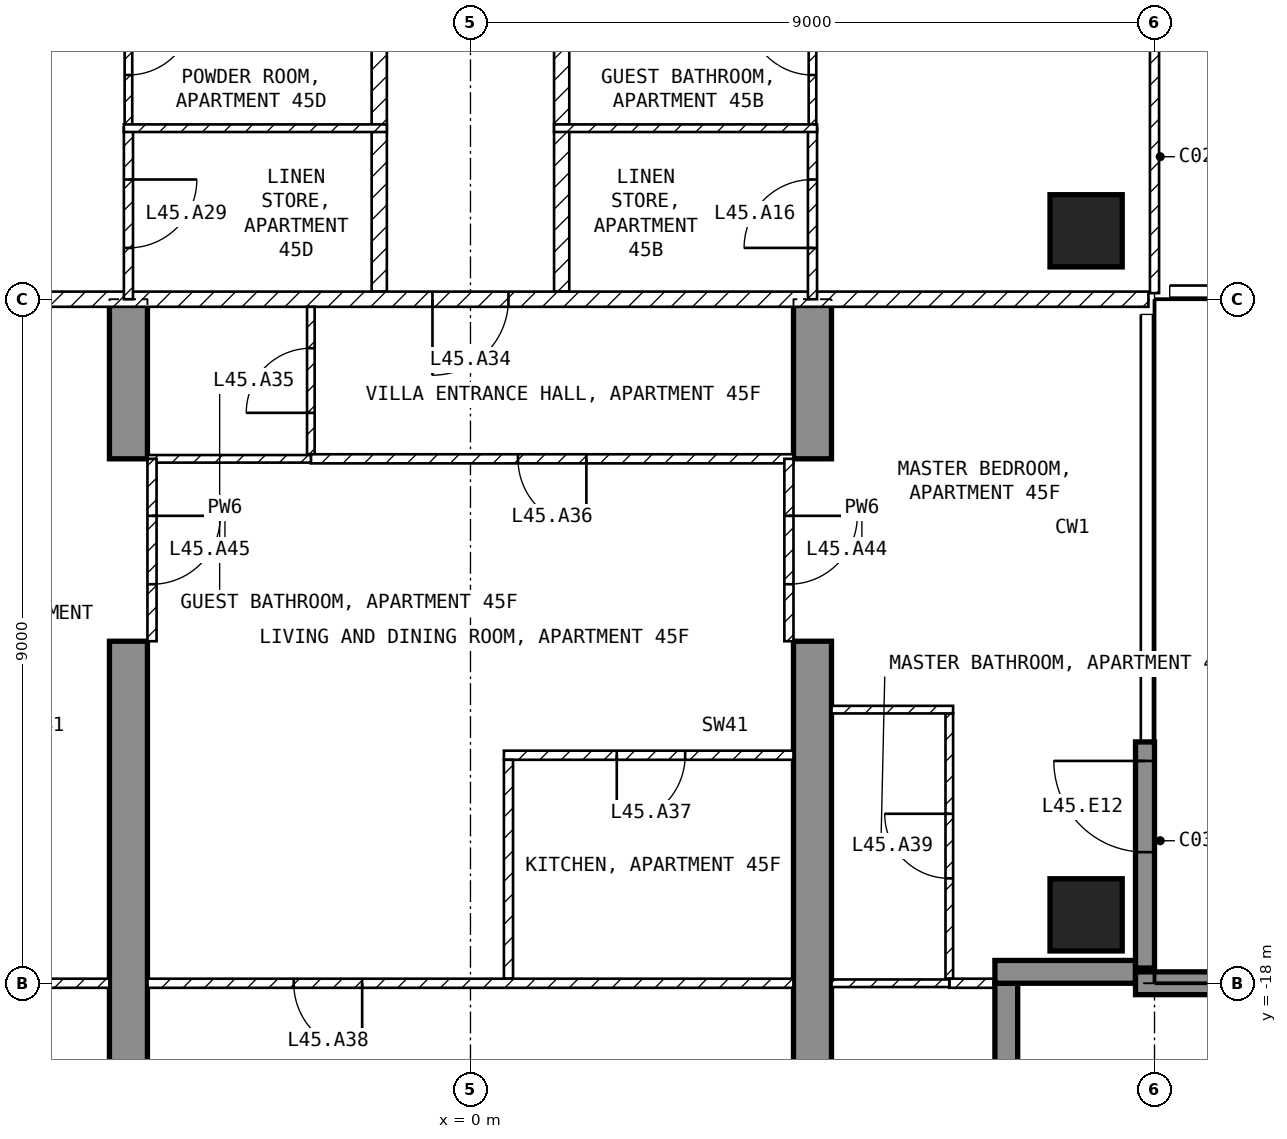
"""IFC4 building model, lengths in metres.
Left out: names, types, materials, properties, quantities, classifications, styles, units other than length and angle.
Written with IfcOpenShell. Run it as: python <this file> out.ifc"""

import sys

from ifc_helpers import new_model, si_unit, direction, frame, frame_2d, origin, origin_2d, place, context, subcontext, project, spatial, polyline, rectangle, outline, extrude, element, fill, save


model = new_model("IFC4")
c1 = context("Model", 3, precision=1e-05, world=origin(), true_north=direction((0.0, 1.0)))
c2 = subcontext(c1, "Body", "Model", "MODEL_VIEW")
j1 = project(units=[si_unit("LENGTHUNIT", "METRE"), si_unit("PLANEANGLEUNIT", "RADIAN")], contexts=[c1])
p1 = place(None, origin())
s1 = spatial("IfcSite", under=j1, at=p1, CompositionType="ELEMENT")
p2 = place(p1, origin())
s2 = spatial("IfcBuilding", under=s1, at=p2, CompositionType="ELEMENT")
p3 = place(p2, frame((0.0, 0.0, 184.1)))
s3 = spatial("IfcBuildingStorey", under=s2, at=p3, CompositionType="ELEMENT", Elevation=184.1)
for number, where, z_axis, x_axis in (
    (1, (8.1, -17.1, -0.25), (0.0, 0.0, 1.0), (1.0, 0.0, 0.0)),
    (2, (8.1, -8.1, -0.25), (0.0, 0.0, 1.0), (1.0, 0.0, 0.0)),
):
    element("IfcColumn", number, at=place(p3, frame(where, z_axis=z_axis, x_axis=x_axis)), inside=s3, PredefinedType="COLUMN", context=c2, shape_type="SweptSolid", body=[
        extrude(rectangle(XDim=0.95, YDim=0.95, at=origin_2d()), origin(), (0.0, 0.0, 1.0), 3.5),
    ])
for number, where, z_axis, x_axis in (
    (3, (-4.75, -20.225, -0.25), (1.0, 0.0, 0.0), (0.0, 1.0, 0.0)),
    (4, (4.25, -20.225, -0.25), (1.0, 0.0, 0.0), (0.0, 1.0, 0.0)),
):
    element("IfcWall", number, at=place(p3, frame(where, z_axis=z_axis, x_axis=x_axis)), inside=s3, PredefinedType="SHEAR", context=c2, shape_type="SweptSolid", body=[
        extrude(outline(polyline([(0.0, 0.0), (6.725, 0.0), (6.725, 2.65), (9.125, 2.65), (9.125, 0.0), (11.225, 0.0), (11.225, 3.5), (0.0, 3.5), (0.0, 0.0)])), origin(), (0.0, 0.0, 1.0), 0.5),
    ])
p4 = place(p3, frame((8.875, -17.8, 0.0), z_axis=(0.0, 0.0, 1.0), x_axis=(0.0, 1.0, 0.0)))
e5 = element("IfcWall", 5, at=p4, inside=s3, PredefinedType="SOLIDWALL", context=c2, shape_type="SweptSolid", body=[
    extrude(rectangle(XDim=2.975, YDim=0.25, at=frame_2d((1.488, 0.0))), origin(), (0.0, 0.0, 1.0), 3.25),
])
p5 = place(p4, frame((1.525, 0.0, 0.0)))
e6 = element("IfcOpeningElement", 6, at=p5, cuts=e5, PredefinedType="OPENING", context=c2, shape_type="SweptSolid", body=[
    extrude(rectangle(XDim=1.2, YDim=2.4, at=frame_2d((0.6, 1.2))), frame((0.0, 0.135, 0.0), z_axis=(0.0, -1.0, 0.0), x_axis=(1.0, 0.0, 0.0)), (0.0, 0.0, 1.0), 0.27),
])
p6 = place(p3, frame((7.05, -19.8, 0.0), z_axis=(0.0, 0.0, 1.0), x_axis=(0.0, 1.0, 0.0)))
e7 = element("IfcWall", 7, at=p6, inside=s3, PredefinedType="SOLIDWALL", context=c2, shape_type="SweptSolid", body=[
    extrude(rectangle(XDim=1.8, YDim=0.3, at=frame_2d((0.9, 0.0))), origin(), (0.0, 0.0, 1.0), 3.25),
])
p7 = place(p3, frame((6.9, -17.85, 0.0), z_axis=(0.0, 0.0, 1.0), x_axis=(1.0, 0.0, 0.0)))
e8 = element("IfcWall", 8, at=p7, inside=s3, PredefinedType="SOLIDWALL", context=c2, shape_type="SweptSolid", body=[
    extrude(rectangle(XDim=1.85, YDim=0.3, at=frame_2d((0.925, 0.0))), origin(), (0.0, 0.0, 1.0), 3.25),
])
p8 = place(p3, frame((8.75, -18.0, 0.0), z_axis=(0.0, 0.0, 1.0), x_axis=(1.0, 0.0, 0.0)))
e9 = element("IfcWall", 9, at=p8, inside=s3, PredefinedType="SOLIDWALL", context=c2, shape_type="SweptSolid", body=[
    extrude(rectangle(XDim=2.95, YDim=0.3, at=frame_2d((1.475, 0.0))), origin(), (0.0, 0.0, 1.0), 3.25),
])
for number, where, z_axis, x_axis in (
    (10, (1.2, -4.6, 0.0), (0.0, 0.0, 1.0), (0.0, -1.0, 0.0)),
    (11, (-1.2, -8.9, 0.0), (0.0, 0.0, 1.0), (0.0, 1.0, 0.0)),
):
    element("IfcWall", number, at=place(p3, frame(where, z_axis=z_axis, x_axis=x_axis)), inside=s3, PredefinedType="PARTITIONING", context=c2, shape_type="SweptSolid", body=[
        extrude(rectangle(XDim=4.3, YDim=0.2, at=frame_2d((2.15, 0.0))), origin(), (0.0, 0.0, 1.0), 3.25),
    ])
p9 = place(p3, frame((8.92, -9.0, 0.0), z_axis=(0.0, 0.0, 1.0), x_axis=(-1.0, 0.0, 0.0)))
e12 = element("IfcWall", 12, at=p9, inside=s3, PredefinedType="PARTITIONING", context=c2, shape_type="SweptSolid", body=[
    extrude(rectangle(XDim=17.84, YDim=0.2, at=frame_2d((8.92, 0.0))), origin(), (0.0, 0.0, 1.0), 3.25),
])
p10 = place(p9, frame((8.42, 0.0, 0.0)))
e13 = element("IfcOpeningElement", 13, at=p10, cuts=e12, PredefinedType="OPENING", context=c2, shape_type="SweptSolid", body=[
    extrude(rectangle(XDim=1.0, YDim=2.1, at=frame_2d((0.5, 1.05))), frame((0.0, 0.11, 0.0), z_axis=(0.0, -1.0, 0.0), x_axis=(1.0, 0.0, 0.0)), (0.0, 0.0, 1.0), 0.22),
])
p11 = place(p3, frame((9.0, -8.92, 0.0), z_axis=(0.0, 0.0, 1.0), x_axis=(0.0, 1.0, 0.0)))
e14 = element("IfcWall", 14, at=p11, inside=s3, PredefinedType="PARTITIONING", context=c2, shape_type="SweptSolid", body=[
    extrude(rectangle(XDim=7.62, YDim=0.12, at=frame_2d((3.81, 0.0))), origin(), (0.0, 0.0, 1.0), 3.25),
])
p12 = place(p11, frame((5.57, 0.0, 0.0)))
e15 = element("IfcOpeningElement", 15, at=p12, cuts=e14, PredefinedType="OPENING", context=c2, shape_type="SweptSolid", body=[
    extrude(rectangle(XDim=0.9, YDim=2.1, at=frame_2d((0.45, 1.05))), frame((0.0, 0.07, 0.0), z_axis=(0.0, -1.0, 0.0), x_axis=(1.0, 0.0, 0.0)), (0.0, 0.0, 1.0), 0.14),
])
p13 = place(p3, frame((4.5, -6.75, 0.0), z_axis=(0.0, 0.0, 1.0), x_axis=(0.0, 1.0, 0.0)))
e16 = element("IfcWall", 16, at=p13, inside=s3, PredefinedType="PARTITIONING", context=c2, shape_type="SweptSolid", body=[
    extrude(rectangle(XDim=2.25, YDim=0.1, at=frame_2d((1.125, 0.0))), origin(), (0.0, 0.0, 1.0), 3.25),
])
p14 = place(p13, frame((0.7, 0.0, 0.0)))
e17 = element("IfcOpeningElement", 17, at=p14, cuts=e16, PredefinedType="OPENING", context=c2, shape_type="SweptSolid", body=[
    extrude(rectangle(XDim=0.85, YDim=2.1, at=frame_2d((0.425, 1.05))), frame((0.0, 0.06, 0.0), z_axis=(0.0, -1.0, 0.0), x_axis=(1.0, 0.0, 0.0)), (0.0, 0.0, 1.0), 0.12),
])
p15 = place(p3, frame((4.5, -9.0, 0.0), z_axis=(0.0, 0.0, 1.0), x_axis=(0.0, 1.0, 0.0)))
e18 = element("IfcWall", 18, at=p15, inside=s3, PredefinedType="PARTITIONING", context=c2, shape_type="SweptSolid", body=[
    extrude(rectangle(XDim=2.25, YDim=0.12, at=frame_2d((1.125, 0.0))), origin(), (0.0, 0.0, 1.0), 3.25),
])
p16 = place(p15, frame((0.675, 0.0, 0.0)))
e19 = element("IfcOpeningElement", 19, at=p16, cuts=e18, PredefinedType="OPENING", context=c2, shape_type="SweptSolid", body=[
    extrude(rectangle(XDim=0.9, YDim=2.1, at=frame_2d((0.45, 1.05))), frame((0.0, 0.07, 0.0), z_axis=(0.0, -1.0, 0.0), x_axis=(1.0, 0.0, 0.0)), (0.0, 0.0, 1.0), 0.14),
])
p17 = place(p3, frame((4.56, -6.75, 0.0), z_axis=(0.0, 0.0, 1.0), x_axis=(-1.0, 0.0, 0.0)))
e20 = element("IfcWall", 20, at=p17, inside=s3, PredefinedType="PARTITIONING", context=c2, shape_type="SweptSolid", body=[
    extrude(rectangle(XDim=3.46, YDim=0.1, at=frame_2d((1.73, 0.0))), origin(), (0.0, 0.0, 1.0), 3.25),
])
p18 = place(p3, frame((-4.5, -4.5, 0.0), z_axis=(0.0, 0.0, 1.0), x_axis=(0.0, -1.0, 0.0)))
e21 = element("IfcWall", 21, at=p18, inside=s3, PredefinedType="PARTITIONING", context=c2, shape_type="SweptSolid", body=[
    extrude(rectangle(XDim=2.25, YDim=0.1, at=frame_2d((1.125, 0.0))), origin(), (0.0, 0.0, 1.0), 3.25),
])
p19 = place(p18, frame((0.7, 0.0, 0.0)))
e22 = element("IfcOpeningElement", 22, at=p19, cuts=e21, PredefinedType="OPENING", context=c2, shape_type="SweptSolid", body=[
    extrude(rectangle(XDim=0.85, YDim=2.1, at=frame_2d((0.425, 1.05))), frame((0.0, 0.06, 0.0), z_axis=(0.0, -1.0, 0.0), x_axis=(1.0, 0.0, 0.0)), (0.0, 0.0, 1.0), 0.12),
])
p20 = place(p3, frame((-4.5, -6.75, 0.0), z_axis=(0.0, 0.0, 1.0), x_axis=(0.0, -1.0, 0.0)))
e23 = element("IfcWall", 23, at=p20, inside=s3, PredefinedType="PARTITIONING", context=c2, shape_type="SweptSolid", body=[
    extrude(rectangle(XDim=2.25, YDim=0.12, at=frame_2d((1.125, 0.0))), origin(), (0.0, 0.0, 1.0), 3.25),
])
p21 = place(p20, frame((0.675, 0.0, 0.0)))
e24 = element("IfcOpeningElement", 24, at=p21, cuts=e23, PredefinedType="OPENING", context=c2, shape_type="SweptSolid", body=[
    extrude(rectangle(XDim=0.9, YDim=2.1, at=frame_2d((0.45, 1.05))), frame((0.0, 0.07, 0.0), z_axis=(0.0, -1.0, 0.0), x_axis=(1.0, 0.0, 0.0)), (0.0, 0.0, 1.0), 0.14),
])
p22 = place(p3, frame((-1.1, -6.75, 0.0), z_axis=(0.0, 0.0, 1.0), x_axis=(-1.0, 0.0, 0.0)))
e25 = element("IfcWall", 25, at=p22, inside=s3, PredefinedType="PARTITIONING", context=c2, shape_type="SweptSolid", body=[
    extrude(rectangle(XDim=3.46, YDim=0.1, at=frame_2d((1.73, 0.0))), origin(), (0.0, 0.0, 1.0), 3.25),
])
p23 = place(p3, frame((-2.1, -11.04, 0.0), z_axis=(0.0, 0.0, 1.0), x_axis=(0.0, 1.0, 0.0)))
e26 = element("IfcWall", 26, at=p23, inside=s3, PredefinedType="PARTITIONING", context=c2, shape_type="SweptSolid", body=[
    extrude(rectangle(XDim=1.94, YDim=0.1, at=frame_2d((0.97, 0.0))), origin(), (0.0, 0.0, 1.0), 3.25),
])
p24 = place(p23, frame((0.545, 0.0, 0.0)))
e27 = element("IfcOpeningElement", 27, at=p24, cuts=e26, PredefinedType="OPENING", context=c2, shape_type="SweptSolid", body=[
    extrude(rectangle(XDim=0.85, YDim=2.1, at=frame_2d((0.425, 1.05))), frame((0.0, 0.06, 0.0), z_axis=(0.0, -1.0, 0.0), x_axis=(1.0, 0.0, 0.0)), (0.0, 0.0, 1.0), 0.12),
])
p25 = place(p3, frame((4.25, -11.1, 0.0), z_axis=(0.0, 0.0, 1.0), x_axis=(-1.0, 0.0, 0.0)))
e28 = element("IfcWall", 28, at=p25, inside=s3, PredefinedType="PARTITIONING", context=c2, shape_type="SweptSolid", body=[
    extrude(rectangle(XDim=6.35, YDim=0.12, at=frame_2d((3.175, 0.0))), origin(), (0.0, 0.0, 1.0), 3.25),
])
p26 = place(p25, frame((2.725, 0.0, 0.0)))
e29 = element("IfcOpeningElement", 29, at=p26, cuts=e28, PredefinedType="OPENING", context=c2, shape_type="SweptSolid", body=[
    extrude(rectangle(XDim=0.9, YDim=2.1, at=frame_2d((0.45, 1.05))), frame((0.0, 0.07, 0.0), z_axis=(0.0, -1.0, 0.0), x_axis=(1.0, 0.0, 0.0)), (0.0, 0.0, 1.0), 0.14),
])
p27 = place(p3, frame((-2.1, -11.1, 0.0), z_axis=(0.0, 0.0, 1.0), x_axis=(-1.0, 0.0, 0.0)))
e30 = element("IfcWall", 30, at=p27, inside=s3, PredefinedType="PARTITIONING", context=c2, shape_type="SweptSolid", body=[
    extrude(rectangle(XDim=2.15, YDim=0.1, at=frame_2d((1.075, 0.0))), origin(), (0.0, 0.0, 1.0), 3.25),
])
p28 = place(p3, frame((4.25, -15.0, 0.0), z_axis=(0.0, 0.0, 1.0), x_axis=(-1.0, 0.0, 0.0)))
e31 = element("IfcWall", 31, at=p28, inside=s3, PredefinedType="PARTITIONING", context=c2, shape_type="SweptSolid", body=[
    extrude(rectangle(XDim=3.81, YDim=0.12, at=frame_2d((1.905, 0.0))), origin(), (0.0, 0.0, 1.0), 3.25),
])
p29 = place(p28, frame((1.425, 0.0, 0.0)))
e32 = element("IfcOpeningElement", 32, at=p29, cuts=e31, PredefinedType="OPENING", context=c2, shape_type="SweptSolid", body=[
    extrude(rectangle(XDim=0.9, YDim=2.1, at=frame_2d((0.45, 1.05))), frame((0.0, 0.07, 0.0), z_axis=(0.0, -1.0, 0.0), x_axis=(1.0, 0.0, 0.0)), (0.0, 0.0, 1.0), 0.14),
])
p30 = place(p3, frame((0.5, -15.06, 0.0), z_axis=(0.0, 0.0, 1.0), x_axis=(0.0, -1.0, 0.0)))
e33 = element("IfcWall", 33, at=p30, inside=s3, PredefinedType="PARTITIONING", context=c2, shape_type="SweptSolid", body=[
    extrude(rectangle(XDim=2.88, YDim=0.12, at=frame_2d((1.44, 0.0))), origin(), (0.0, 0.0, 1.0), 3.25),
])
p31 = place(p3, frame((4.25, -18.0, 0.0), z_axis=(0.0, 0.0, 1.0), x_axis=(-1.0, 0.0, 0.0)))
e34 = element("IfcWall", 34, at=p31, inside=s3, PredefinedType="PARTITIONING", context=c2, shape_type="SweptSolid", body=[
    extrude(rectangle(XDim=8.5, YDim=0.12, at=frame_2d((4.25, 0.0))), origin(), (0.0, 0.0, 1.0), 3.25),
])
p32 = place(p31, frame((5.675, 0.0, 0.0)))
e35 = element("IfcOpeningElement", 35, at=p32, cuts=e34, PredefinedType="OPENING", context=c2, shape_type="SweptSolid", body=[
    extrude(rectangle(XDim=0.9, YDim=2.1, at=frame_2d((0.45, 1.05))), frame((0.0, 0.07, 0.0), z_axis=(0.0, -1.0, 0.0), x_axis=(1.0, 0.0, 0.0)), (0.0, 0.0, 1.0), 0.14),
])
p33 = place(p3, frame((6.3, -17.94, 0.0), z_axis=(0.0, 0.0, 1.0), x_axis=(0.0, 1.0, 0.0)))
e36 = element("IfcWall", 36, at=p33, inside=s3, PredefinedType="PARTITIONING", context=c2, shape_type="SweptSolid", body=[
    extrude(rectangle(XDim=3.49, YDim=0.1, at=frame_2d((1.745, 0.0))), origin(), (0.0, 0.0, 1.0), 3.25),
])
p34 = place(p33, frame((1.32, 0.0, 0.0)))
e37 = element("IfcOpeningElement", 37, at=p34, cuts=e36, PredefinedType="OPENING", context=c2, shape_type="SweptSolid", body=[
    extrude(rectangle(XDim=0.85, YDim=2.1, at=frame_2d((0.425, 1.05))), frame((0.0, 0.06, 0.0), z_axis=(0.0, -1.0, 0.0), x_axis=(1.0, 0.0, 0.0)), (0.0, 0.0, 1.0), 0.12),
])
p35 = place(p3, frame((6.35, -14.4, 0.0), z_axis=(0.0, 0.0, 1.0), x_axis=(-1.0, 0.0, 0.0)))
e38 = element("IfcWall", 38, at=p35, inside=s3, PredefinedType="PARTITIONING", context=c2, shape_type="SweptSolid", body=[
    extrude(rectangle(XDim=1.6, YDim=0.1, at=frame_2d((0.8, 0.0))), origin(), (0.0, 0.0, 1.0), 3.25),
])
p36 = place(p3, frame((7.12, -18.0, 0.0), z_axis=(0.0, 0.0, 1.0), x_axis=(-1.0, 0.0, 0.0)))
e39 = element("IfcWall", 39, at=p36, inside=s3, PredefinedType="PARTITIONING", context=c2, shape_type="SweptSolid", body=[
    extrude(rectangle(XDim=0.82, YDim=0.12, at=frame_2d((0.41, 0.0))), origin(), (0.0, 0.0, 1.0), 3.25),
])
p37 = place(p3, frame((6.3, -18.0, 0.0), z_axis=(0.0, 0.0, 1.0), x_axis=(-1.0, 0.0, 0.0)))
e40 = element("IfcWall", 40, at=p37, inside=s3, PredefinedType="PARTITIONING", context=c2, shape_type="SweptSolid", body=[
    extrude(rectangle(XDim=1.55, YDim=0.1, at=frame_2d((0.775, 0.0))), origin(), (0.0, 0.0, 1.0), 3.25),
])
p38 = place(p3, frame((-4.75, -18.0, 0.0), z_axis=(0.0, 0.0, 1.0), x_axis=(-1.0, 0.0, 0.0)))
e41 = element("IfcWall", 41, at=p38, inside=s3, PredefinedType="PARTITIONING", context=c2, shape_type="SweptSolid", body=[
    extrude(rectangle(XDim=2.37, YDim=0.12, at=frame_2d((1.185, 0.0))), origin(), (0.0, 0.0, 1.0), 3.25),
])
p39 = place(p3, frame((4.19, -11.1, 0.0), z_axis=(0.0, 0.0, 1.0), x_axis=(0.0, -1.0, 0.0)))
e42 = element("IfcWall", 42, at=p39, inside=s3, PredefinedType="PARTITIONING", context=c2, shape_type="SweptSolid", body=[
    extrude(rectangle(XDim=2.4, YDim=0.12, at=frame_2d((1.2, 0.0))), origin(), (0.0, 0.0, 1.0), 2.4),
])
p40 = place(p39, frame((0.75, 0.0, 0.0)))
e43 = element("IfcOpeningElement", 43, at=p40, cuts=e42, PredefinedType="OPENING", context=c2, shape_type="SweptSolid", body=[
    extrude(rectangle(XDim=0.9, YDim=2.1, at=frame_2d((0.45, 1.05))), frame((0.0, 0.07, 0.0), z_axis=(0.0, -1.0, 0.0), x_axis=(1.0, 0.0, 0.0)), (0.0, 0.0, 1.0), 0.14),
])
p41 = place(p3, frame((-4.19, -11.1, 0.0), z_axis=(0.0, 0.0, 1.0), x_axis=(0.0, -1.0, 0.0)))
e44 = element("IfcWall", 44, at=p41, inside=s3, PredefinedType="PARTITIONING", context=c2, shape_type="SweptSolid", body=[
    extrude(rectangle(XDim=2.4, YDim=0.12, at=frame_2d((1.2, 0.0))), origin(), (0.0, 0.0, 1.0), 2.4),
])
p42 = place(p41, frame((0.75, 0.0, 0.0)))
e45 = element("IfcOpeningElement", 45, at=p42, cuts=e44, PredefinedType="OPENING", context=c2, shape_type="SweptSolid", body=[
    extrude(rectangle(XDim=0.9, YDim=2.1, at=frame_2d((0.45, 1.05))), frame((0.0, 0.07, 0.0), z_axis=(0.0, -1.0, 0.0), x_axis=(1.0, 0.0, 0.0)), (0.0, 0.0, 1.0), 0.14),
])
p43 = place(p5, origin())
e46 = element("IfcDoor", 46, at=p43, inside=s3, OperationType="SINGLE_SWING_RIGHT", PredefinedType="DOOR", context=c2, shape_type="SweptSolid", body=[
    extrude(rectangle(XDim=1.2, YDim=2.4, at=frame_2d((0.6, 1.2))), frame((0.0, 0.025, 0.0), z_axis=(0.0, -1.0, 0.0), x_axis=(1.0, 0.0, 0.0)), (0.0, 0.0, 1.0), 0.05),
])
fill(e6, e46)
p44 = place(p14, origin())
e47 = element("IfcDoor", 47, at=p44, inside=s3, OperationType="SINGLE_SWING_RIGHT", PredefinedType="DOOR", context=c2, shape_type="SweptSolid", body=[
    extrude(rectangle(XDim=0.85, YDim=2.1, at=frame_2d((0.425, 1.05))), frame((0.0, 0.025, 0.0), z_axis=(0.0, -1.0, 0.0), x_axis=(1.0, 0.0, 0.0)), (0.0, 0.0, 1.0), 0.05),
])
fill(e17, e47)
p45 = place(p16, origin())
e48 = element("IfcDoor", 48, at=p45, inside=s3, OperationType="SINGLE_SWING_LEFT", PredefinedType="DOOR", context=c2, shape_type="SweptSolid", body=[
    extrude(rectangle(XDim=0.9, YDim=2.1, at=frame_2d((0.45, 1.05))), frame((0.0, 0.025, 0.0), z_axis=(0.0, -1.0, 0.0), x_axis=(1.0, 0.0, 0.0)), (0.0, 0.0, 1.0), 0.05),
])
fill(e19, e48)
p46 = place(p21, origin())
e49 = element("IfcDoor", 49, at=p46, inside=s3, OperationType="SINGLE_SWING_LEFT", PredefinedType="DOOR", context=c2, shape_type="SweptSolid", body=[
    extrude(rectangle(XDim=0.9, YDim=2.1, at=frame_2d((0.45, 1.05))), frame((0.0, 0.025, 0.0), z_axis=(0.0, -1.0, 0.0), x_axis=(1.0, 0.0, 0.0)), (0.0, 0.0, 1.0), 0.05),
])
fill(e24, e49)
p47 = place(p19, origin())
e50 = element("IfcDoor", 50, at=p47, inside=s3, OperationType="SINGLE_SWING_LEFT", PredefinedType="DOOR", context=c2, shape_type="SweptSolid", body=[
    extrude(rectangle(XDim=0.85, YDim=2.1, at=frame_2d((0.425, 1.05))), frame((0.0, 0.025, 0.0), z_axis=(0.0, -1.0, 0.0), x_axis=(1.0, 0.0, 0.0)), (0.0, 0.0, 1.0), 0.05),
])
fill(e22, e50)
p48 = place(p10, origin())
e51 = element("IfcDoor", 51, at=p48, inside=s3, OperationType="SINGLE_SWING_RIGHT", PredefinedType="DOOR", context=c2, shape_type="SweptSolid", body=[
    extrude(rectangle(XDim=1.0, YDim=2.1, at=frame_2d((0.5, 1.05))), frame((0.0, 0.025, 0.0), z_axis=(0.0, -1.0, 0.0), x_axis=(1.0, 0.0, 0.0)), (0.0, 0.0, 1.0), 0.05),
])
fill(e13, e51)
p49 = place(p24, origin())
e52 = element("IfcDoor", 52, at=p49, inside=s3, OperationType="SINGLE_SWING_LEFT", PredefinedType="DOOR", context=c2, shape_type="SweptSolid", body=[
    extrude(rectangle(XDim=0.85, YDim=2.1, at=frame_2d((0.425, 1.05))), frame((0.0, 0.025, 0.0), z_axis=(0.0, -1.0, 0.0), x_axis=(1.0, 0.0, 0.0)), (0.0, 0.0, 1.0), 0.05),
])
fill(e27, e52)
p50 = place(p26, origin())
e53 = element("IfcDoor", 53, at=p50, inside=s3, OperationType="SINGLE_SWING_LEFT", PredefinedType="DOOR", context=c2, shape_type="SweptSolid", body=[
    extrude(rectangle(XDim=0.9, YDim=2.1, at=frame_2d((0.45, 1.05))), frame((0.0, 0.025, 0.0), z_axis=(0.0, -1.0, 0.0), x_axis=(1.0, 0.0, 0.0)), (0.0, 0.0, 1.0), 0.05),
])
fill(e29, e53)
p51 = place(p29, origin())
e54 = element("IfcDoor", 54, at=p51, inside=s3, OperationType="SINGLE_SWING_RIGHT", PredefinedType="DOOR", context=c2, shape_type="SweptSolid", body=[
    extrude(rectangle(XDim=0.9, YDim=2.1, at=frame_2d((0.45, 1.05))), frame((0.0, 0.025, 0.0), z_axis=(0.0, -1.0, 0.0), x_axis=(1.0, 0.0, 0.0)), (0.0, 0.0, 1.0), 0.05),
])
fill(e32, e54)
p52 = place(p32, origin())
e55 = element("IfcDoor", 55, at=p52, inside=s3, OperationType="SINGLE_SWING_LEFT", PredefinedType="DOOR", context=c2, shape_type="SweptSolid", body=[
    extrude(rectangle(XDim=0.9, YDim=2.1, at=frame_2d((0.45, 1.05))), frame((0.0, 0.025, 0.0), z_axis=(0.0, -1.0, 0.0), x_axis=(1.0, 0.0, 0.0)), (0.0, 0.0, 1.0), 0.05),
])
fill(e35, e55)
p53 = place(p34, origin())
e56 = element("IfcDoor", 56, at=p53, inside=s3, OperationType="SINGLE_SWING_RIGHT", PredefinedType="DOOR", context=c2, shape_type="SweptSolid", body=[
    extrude(rectangle(XDim=0.85, YDim=2.1, at=frame_2d((0.425, 1.05))), frame((0.0, 0.025, 0.0), z_axis=(0.0, -1.0, 0.0), x_axis=(1.0, 0.0, 0.0)), (0.0, 0.0, 1.0), 0.05),
])
fill(e37, e56)
p54 = place(p40, origin())
e57 = element("IfcDoor", 57, at=p54, inside=s3, OperationType="SINGLE_SWING_LEFT", PredefinedType="DOOR", context=c2, shape_type="SweptSolid", body=[
    extrude(rectangle(XDim=0.9, YDim=2.1, at=frame_2d((0.45, 1.05))), frame((0.0, 0.025, 0.0), z_axis=(0.0, -1.0, 0.0), x_axis=(1.0, 0.0, 0.0)), (0.0, 0.0, 1.0), 0.05),
])
fill(e43, e57)
p55 = place(p42, origin())
e58 = element("IfcDoor", 58, at=p55, inside=s3, OperationType="SINGLE_SWING_LEFT", PredefinedType="DOOR", context=c2, shape_type="SweptSolid", body=[
    extrude(rectangle(XDim=0.9, YDim=2.1, at=frame_2d((0.45, 1.05))), frame((0.0, 0.025, 0.0), z_axis=(0.0, -1.0, 0.0), x_axis=(1.0, 0.0, 0.0)), (0.0, 0.0, 1.0), 0.05),
])
fill(e45, e58)
save(model, sys.argv[1])
